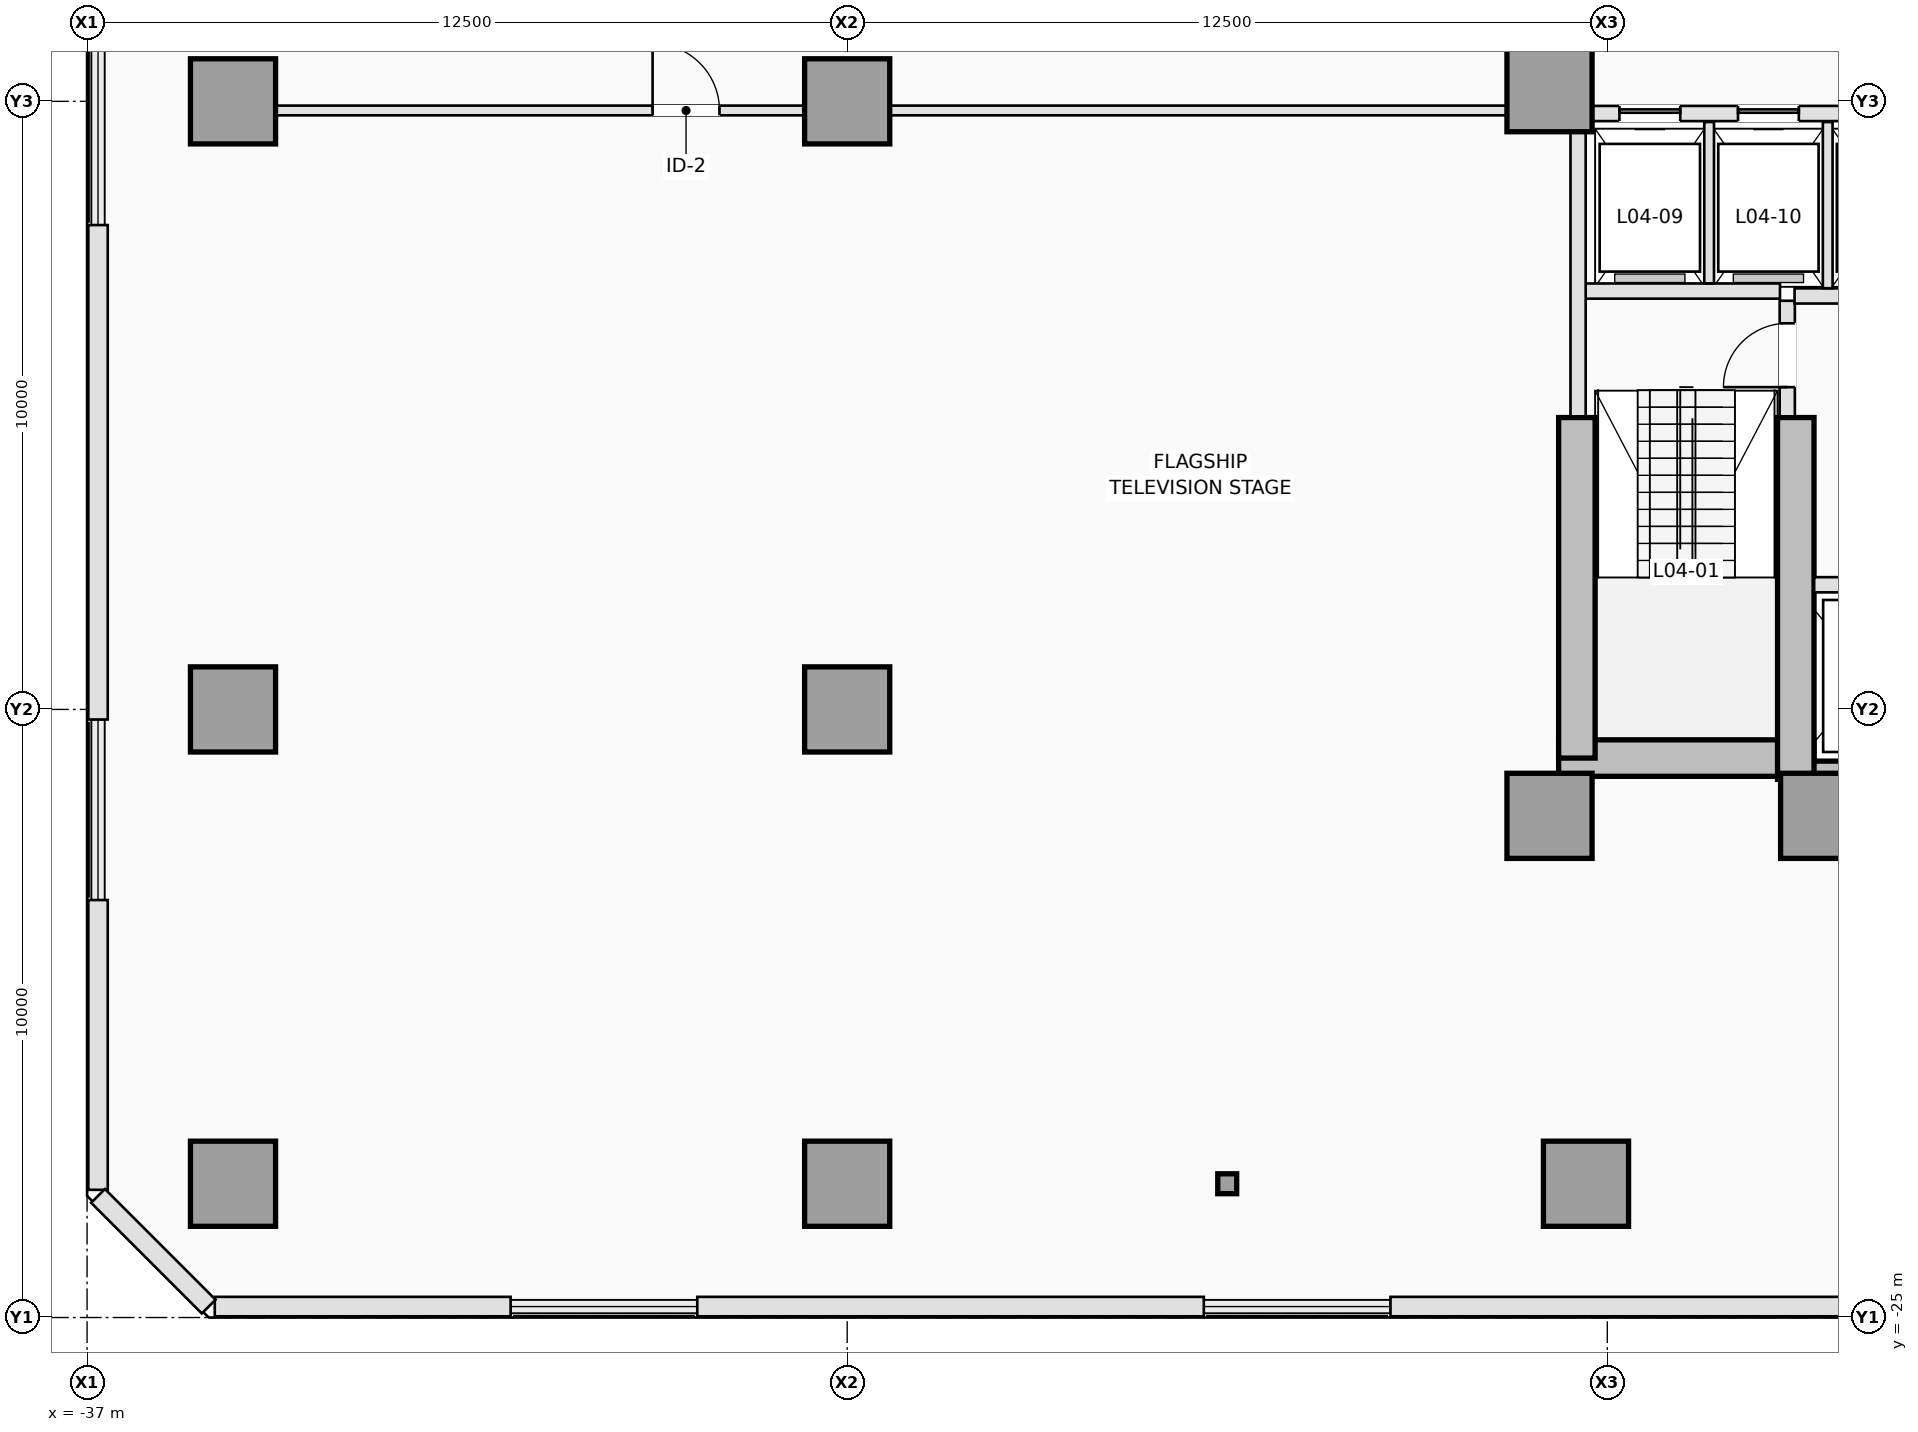
"""IFC4 building model, lengths in metres.
Left out: names, types, materials, properties, quantities, classifications, styles, units other than length and angle.
Written with IfcOpenShell. Run it as: python <this file> out.ifc"""

import sys

from ifc_helpers import new_model, si_unit, direction, frame, frame_2d, origin, origin_2d, place, context, subcontext, project, spatial, rectangle, i_section, extrude, element, fill, save


model = new_model("IFC4")
c1 = context("Model", 3, precision=1e-05, world=origin(), true_north=direction((0.0, 1.0)))
c2 = subcontext(c1, "Body", "Model", "MODEL_VIEW")
j1 = project(units=[si_unit("LENGTHUNIT", "METRE"), si_unit("PLANEANGLEUNIT", "RADIAN")], contexts=[c1])
p1 = place(None, origin())
s1 = spatial("IfcSite", under=j1, at=p1, CompositionType="ELEMENT")
p2 = place(p1, origin())
s2 = spatial("IfcBuilding", under=s1, at=p2, CompositionType="ELEMENT")
p3 = place(p2, frame((0.0, 0.0, 18.5)))
s3 = spatial("IfcBuildingStorey", under=s2, at=p3, CompositionType="ELEMENT", Elevation=18.5)
p4 = place(p3, frame((-12.8, -15.8, 0.0), z_axis=(0.0, 0.0, 1.0), x_axis=(1.0, 0.0, 0.0)))
e1 = element("IfcWall", 1, at=p4, inside=s3, PredefinedType="SHEAR", context=c2, shape_type="SweptSolid", body=[
    extrude(rectangle(XDim=4.2, YDim=0.6, at=frame_2d((2.1, 0.0))), origin(), (0.0, 0.0, 1.0), 4.5),
])
p5 = place(p3, frame((-8.9, -16.15, 0.0), z_axis=(0.0, 0.0, 1.0), x_axis=(1.0, 0.0, 0.0)))
e2 = element("IfcWall", 2, at=p5, inside=s3, PredefinedType="SHEAR", context=c2, shape_type="SweptSolid", body=[
    extrude(rectangle(XDim=5.15, YDim=0.6, at=frame_2d((2.575, 0.0))), origin(), (0.0, 0.0, 1.0), 4.5),
])
p6 = place(p3, frame((-12.5, -15.8, 0.0), z_axis=(0.0, 0.0, 1.0), x_axis=(0.0, 1.0, 0.0)))
e3 = element("IfcWall", 3, at=p6, inside=s3, PredefinedType="SHEAR", context=c2, shape_type="SweptSolid", body=[
    extrude(rectangle(XDim=5.6, YDim=0.6, at=frame_2d((2.8, 0.0))), origin(), (0.0, 0.0, 1.0), 4.5),
])
p7 = place(p3, frame((-8.9, -16.15, 0.0), z_axis=(0.0, 0.0, 1.0), x_axis=(0.0, 1.0, 0.0)))
e4 = element("IfcWall", 4, at=p7, inside=s3, PredefinedType="SHEAR", context=c2, shape_type="SweptSolid", body=[
    extrude(rectangle(XDim=5.95, YDim=0.6, at=frame_2d((2.975, 0.0))), origin(), (0.0, 0.0, 1.0), 4.5),
])
for number, where, z_axis, x_axis in (
    (5, (-12.95, -16.75, 0.0), (0.0, 0.0, 1.0), (1.0, 0.0, 0.0)),
    (6, (-8.45, -16.75, 0.0), (0.0, 0.0, 1.0), (1.0, 0.0, 0.0)),
    (7, (-12.95, -4.8, 0.0), (0.0, 0.0, 1.0), (1.0, 0.0, 0.0)),
    (8, (-34.6, -22.8, 0.0), (0.0, 0.0, 1.0), (1.0, 0.0, 0.0)),
    (9, (-24.5, -22.8, 0.0), (0.0, 0.0, 1.0), (1.0, 0.0, 0.0)),
    (10, (-12.35, -22.8, 0.0), (0.0, 0.0, 1.0), (1.0, 0.0, 0.0)),
    (11, (-34.6, -15.0, 0.0), (0.0, 0.0, 1.0), (1.0, 0.0, 0.0)),
    (12, (-24.5, -15.0, 0.0), (0.0, 0.0, 1.0), (1.0, 0.0, 0.0)),
    (13, (-34.6, -5.0, 0.0), (0.0, 0.0, 1.0), (1.0, 0.0, 0.0)),
    (14, (-24.5, -5.0, 0.0), (0.0, 0.0, 1.0), (1.0, 0.0, 0.0)),
):
    element("IfcColumn", number, at=place(p3, frame(where, z_axis=z_axis, x_axis=x_axis)), inside=s3, PredefinedType="COLUMN", context=c2, shape_type="SweptSolid", body=[
        extrude(rectangle(XDim=1.4, YDim=1.4, at=origin_2d()), origin(), (0.0, 0.0, 1.0), 4.5),
    ])
p8 = place(p3, frame((-18.25, -22.8, 0.0), z_axis=(0.0, 0.0, 1.0), x_axis=(1.0, 0.0, 0.0)))
e15 = element("IfcColumn", 15, at=p8, inside=s3, PredefinedType="COLUMN", context=c2, shape_type="SweptSolid", body=[
    extrude(i_section(OverallWidth=0.311, OverallDepth=0.327, WebThickness=0.016, FlangeThickness=0.025, FilletRadius=0.017, at=origin_2d()), origin(), (0.0, 0.0, 1.0), 4.5),
])
p9 = place(p3, frame((-7.235, -24.82, 0.0), z_axis=(0.0, 0.0, 1.0), x_axis=(-1.0, 0.0, 0.0)))
e16 = element("IfcWall", 16, at=p9, inside=s3, PredefinedType="STANDARD", context=c2, shape_type="SweptSolid", body=[
    extrude(rectangle(XDim=8.33, YDim=0.32, at=frame_2d((4.165, 0.0))), origin(), (0.0, 0.0, 1.0), 4.08),
])
p10 = place(p3, frame((-18.635, -24.82, 0.0), z_axis=(0.0, 0.0, 1.0), x_axis=(-1.0, 0.0, 0.0)))
e17 = element("IfcWall", 17, at=p10, inside=s3, PredefinedType="STANDARD", context=c2, shape_type="SweptSolid", body=[
    extrude(rectangle(XDim=8.33, YDim=0.32, at=frame_2d((4.165, 0.0))), origin(), (0.0, 0.0, 1.0), 4.08),
])
p11 = place(p3, frame((-30.035, -24.82, 0.0), z_axis=(0.0, 0.0, 1.0), x_axis=(-1.0, 0.0, 0.0)))
e18 = element("IfcWall", 18, at=p11, inside=s3, PredefinedType="STANDARD", context=c2, shape_type="SweptSolid", body=[
    extrude(rectangle(XDim=4.865, YDim=0.32, at=frame_2d((2.433, 0.0))), origin(), (0.0, 0.0, 1.0), 4.08),
])
p12 = place(p3, frame((-36.82, -22.9, 0.0), z_axis=(0.0, 0.0, 1.0), x_axis=(0.0, 1.0, 0.0)))
e19 = element("IfcWall", 19, at=p12, inside=s3, PredefinedType="STANDARD", context=c2, shape_type="SweptSolid", body=[
    extrude(rectangle(XDim=4.765, YDim=0.32, at=frame_2d((2.383, 0.0))), origin(), (0.0, 0.0, 1.0), 4.08),
])
p13 = place(p3, frame((-36.82, -15.165, 0.0), z_axis=(0.0, 0.0, 1.0), x_axis=(0.0, 1.0, 0.0)))
e20 = element("IfcWall", 20, at=p13, inside=s3, PredefinedType="STANDARD", context=c2, shape_type="SweptSolid", body=[
    extrude(rectangle(XDim=8.131, YDim=0.32, at=frame_2d((4.065, 0.0))), origin(), (0.0, 0.0, 1.0), 4.08),
])
p14 = place(p3, frame((-35.0, -24.82, 0.0), z_axis=(0.0, 0.0, 1.0), x_axis=(-0.707106781187, 0.707106781187, 0.0)))
e21 = element("IfcWall", 21, at=p14, inside=s3, PredefinedType="STANDARD", context=c2, shape_type="SweptSolid", body=[
    extrude(rectangle(XDim=2.574, YDim=0.32, at=frame_2d((1.287, 0.0))), origin(), (0.0, 0.0, 1.0), 4.08),
])
p15 = place(p3, frame((-9.04, -10.18, 0.0), z_axis=(0.0, 0.0, 1.0), x_axis=(0.0, 1.0, 0.0)))
e22 = element("IfcWall", 22, at=p15, inside=s3, PredefinedType="PARTITIONING", context=c2, shape_type="SweptSolid", body=[
    extrude(rectangle(XDim=1.9, YDim=0.25, at=frame_2d((0.95, 0.0))), origin(), (0.0, 0.0, 1.0), 4.08),
])
p16 = place(p15, frame((0.48, 0.0, 0.0)))
e23 = element("IfcOpeningElement", 23, at=p16, cuts=e22, PredefinedType="OPENING", context=c2, shape_type="SweptSolid", body=[
    extrude(rectangle(XDim=1.05, YDim=2.15, at=frame_2d((0.525, 1.075))), frame((0.0, 0.135, 0.0), z_axis=(0.0, -1.0, 0.0), x_axis=(1.0, 0.0, 0.0)), (0.0, 0.0, 1.0), 0.27),
])
p17 = place(p3, frame((-12.38, -8.12, 0.0), z_axis=(0.0, 0.0, 1.0), x_axis=(1.0, 0.0, 0.0)))
e24 = element("IfcWall", 24, at=p17, inside=s3, PredefinedType="PARTITIONING", context=c2, shape_type="SweptSolid", body=[
    extrude(rectangle(XDim=3.22, YDim=0.25, at=frame_2d((1.61, 0.0))), origin(), (0.0, 0.0, 1.0), 4.08),
])
p18 = place(p3, frame((-12.48, -10.18, 0.0), z_axis=(0.0, 0.0, 1.0), x_axis=(0.0, 1.0, 0.0)))
e25 = element("IfcWall", 25, at=p18, inside=s3, PredefinedType="PARTITIONING", context=c2, shape_type="SweptSolid", body=[
    extrude(rectangle(XDim=4.678, YDim=0.25, at=frame_2d((2.339, 0.0))), origin(), (0.0, 0.0, 1.0), 4.08),
])
p19 = place(p3, frame((-8.598, -12.95, 0.0), z_axis=(0.0, 0.0, 1.0), x_axis=(1.0, 0.0, 0.0)))
e26 = element("IfcWall", 26, at=p19, inside=s3, PredefinedType="PARTITIONING", context=c2, shape_type="SweptSolid", body=[
    extrude(rectangle(XDim=4.918, YDim=0.25, at=frame_2d((2.459, 0.0))), origin(), (0.0, 0.0, 1.0), 4.08),
])
p20 = place(p19, frame((0.498, 0.0, 0.0)))
e27 = element("IfcOpeningElement", 27, at=p20, cuts=e26, PredefinedType="OPENING", context=c2, shape_type="SweptSolid", body=[
    extrude(rectangle(XDim=1.1, YDim=2.15, at=frame_2d((0.55, 1.075))), frame((0.0, 0.135, 0.0), z_axis=(0.0, -1.0, 0.0), x_axis=(1.0, 0.0, 0.0)), (0.0, 0.0, 1.0), 0.27),
])
p21 = place(p19, frame((2.398, 0.0, 0.0)))
e28 = element("IfcOpeningElement", 28, at=p21, cuts=e26, PredefinedType="OPENING", context=c2, shape_type="SweptSolid", body=[
    extrude(rectangle(XDim=0.88, YDim=2.1, at=frame_2d((0.44, 1.05))), frame((0.0, 0.135, 0.0), z_axis=(0.0, -1.0, 0.0), x_axis=(1.0, 0.0, 0.0)), (0.0, 0.0, 1.0), 0.27),
])
p22 = place(p19, frame((3.798, 0.0, 0.0)))
e29 = element("IfcOpeningElement", 29, at=p22, cuts=e26, PredefinedType="OPENING", context=c2, shape_type="SweptSolid", body=[
    extrude(rectangle(XDim=0.88, YDim=2.1, at=frame_2d((0.44, 1.05))), frame((0.0, 0.135, 0.0), z_axis=(0.0, -1.0, 0.0), x_axis=(1.0, 0.0, 0.0)), (0.0, 0.0, 1.0), 0.27),
])
p23 = place(p3, frame((-8.92, -8.2, 0.0), z_axis=(0.0, 0.0, 1.0), x_axis=(1.0, 0.0, 0.0)))
e30 = element("IfcWall", 30, at=p23, inside=s3, PredefinedType="PARTITIONING", context=c2, shape_type="SweptSolid", body=[
    extrude(rectangle(XDim=5.24, YDim=0.25, at=frame_2d((2.62, 0.0))), origin(), (0.0, 0.0, 1.0), 4.08),
])
p24 = place(p3, frame((-12.248, -5.2, 0.0), z_axis=(0.0, 0.0, 1.0), x_axis=(1.0, 0.0, 0.0)))
e31 = element("IfcWall", 31, at=p24, inside=s3, PredefinedType="PARTITIONING", context=c2, shape_type="SweptSolid", body=[
    extrude(rectangle(XDim=7.796, YDim=0.25, at=frame_2d((3.898, 0.0))), origin(), (0.0, 0.0, 1.0), 4.08),
])
p25 = place(p24, frame((0.448, 0.0, 0.0)))
e32 = element("IfcOpeningElement", 32, at=p25, cuts=e31, PredefinedType="OPENING", context=c2, shape_type="SweptSolid", body=[
    extrude(rectangle(XDim=1.0, YDim=2.15, at=frame_2d((0.5, 1.075))), frame((0.0, 0.135, 0.0), z_axis=(0.0, -1.0, 0.0), x_axis=(1.0, 0.0, 0.0)), (0.0, 0.0, 1.0), 0.27),
])
p26 = place(p24, frame((2.398, 0.0, 0.0)))
e33 = element("IfcOpeningElement", 33, at=p26, cuts=e31, PredefinedType="OPENING", context=c2, shape_type="SweptSolid", body=[
    extrude(rectangle(XDim=1.0, YDim=2.15, at=frame_2d((0.5, 1.075))), frame((0.0, 0.135, 0.0), z_axis=(0.0, -1.0, 0.0), x_axis=(1.0, 0.0, 0.0)), (0.0, 0.0, 1.0), 0.27),
])
p27 = place(p24, frame((4.348, 0.0, 0.0)))
e34 = element("IfcOpeningElement", 34, at=p27, cuts=e31, PredefinedType="OPENING", context=c2, shape_type="SweptSolid", body=[
    extrude(rectangle(XDim=1.0, YDim=2.15, at=frame_2d((0.5, 1.075))), frame((0.0, 0.135, 0.0), z_axis=(0.0, -1.0, 0.0), x_axis=(1.0, 0.0, 0.0)), (0.0, 0.0, 1.0), 0.27),
])
p28 = place(p24, frame((6.298, 0.0, 0.0)))
e35 = element("IfcOpeningElement", 35, at=p28, cuts=e31, PredefinedType="OPENING", context=c2, shape_type="SweptSolid", body=[
    extrude(rectangle(XDim=1.0, YDim=2.15, at=frame_2d((0.5, 1.075))), frame((0.0, 0.135, 0.0), z_axis=(0.0, -1.0, 0.0), x_axis=(1.0, 0.0, 0.0)), (0.0, 0.0, 1.0), 0.27),
])
p29 = place(p3, frame((-10.325, -7.993, 0.0), z_axis=(0.0, 0.0, 1.0), x_axis=(0.0, 1.0, 0.0)))
e36 = element("IfcWall", 36, at=p29, inside=s3, PredefinedType="PARTITIONING", context=c2, shape_type="SweptSolid", body=[
    extrude(rectangle(XDim=2.653, YDim=0.16, at=frame_2d((1.326, 0.0))), origin(), (0.0, 0.0, 1.0), 4.08),
])
p30 = place(p3, frame((-8.375, -8.073, 0.0), z_axis=(0.0, 0.0, 1.0), x_axis=(0.0, 1.0, 0.0)))
e37 = element("IfcWall", 37, at=p30, inside=s3, PredefinedType="PARTITIONING", context=c2, shape_type="SweptSolid", body=[
    extrude(rectangle(XDim=2.733, YDim=0.16, at=frame_2d((1.366, 0.0))), origin(), (0.0, 0.0, 1.0), 4.08),
])
p31 = place(p3, frame((-33.898, -5.15, 0.0), z_axis=(0.0, 0.0, 1.0), x_axis=(1.0, 0.0, 0.0)))
e38 = element("IfcWall", 38, at=p31, inside=s3, PredefinedType="PARTITIONING", context=c2, shape_type="SweptSolid", body=[
    extrude(rectangle(XDim=8.696, YDim=0.16, at=frame_2d((4.348, 0.0))), origin(), (0.0, 0.0, 1.0), 3.056),
])
p32 = place(p31, frame((6.198, 0.0, 0.0)))
e39 = element("IfcOpeningElement", 39, at=p32, cuts=e38, PredefinedType="OPENING", context=c2, shape_type="SweptSolid", body=[
    extrude(rectangle(XDim=1.1, YDim=2.15, at=frame_2d((0.55, 1.075))), frame((0.0, 0.09, 0.0), z_axis=(0.0, -1.0, 0.0), x_axis=(1.0, 0.0, 0.0)), (0.0, 0.0, 1.0), 0.18),
])
p33 = place(p3, frame((-23.798, -5.15, 0.0), z_axis=(0.0, 0.0, 1.0), x_axis=(1.0, 0.0, 0.0)))
e40 = element("IfcWall", 40, at=p33, inside=s3, PredefinedType="PARTITIONING", context=c2, shape_type="SweptSolid", body=[
    extrude(rectangle(XDim=10.146, YDim=0.16, at=frame_2d((5.073, 0.0))), origin(), (0.0, 0.0, 1.0), 3.056),
])
p34 = place(p25, origin())
e41 = element("IfcDoor", 41, at=p34, inside=s3, OperationType="SLIDING_TO_LEFT", PredefinedType="DOOR", context=c2, shape_type="SweptSolid", body=[
    extrude(rectangle(XDim=1.0, YDim=2.15, at=frame_2d((0.5, 1.075))), frame((0.0, 0.025, 0.0), z_axis=(0.0, -1.0, 0.0), x_axis=(1.0, 0.0, 0.0)), (0.0, 0.0, 1.0), 0.05),
])
fill(e32, e41)
p35 = place(p26, origin())
e42 = element("IfcDoor", 42, at=p35, inside=s3, OperationType="SLIDING_TO_LEFT", PredefinedType="DOOR", context=c2, shape_type="SweptSolid", body=[
    extrude(rectangle(XDim=1.0, YDim=2.15, at=frame_2d((0.5, 1.075))), frame((0.0, 0.025, 0.0), z_axis=(0.0, -1.0, 0.0), x_axis=(1.0, 0.0, 0.0)), (0.0, 0.0, 1.0), 0.05),
])
fill(e33, e42)
p36 = place(p16, origin())
e43 = element("IfcDoor", 43, at=p36, inside=s3, OperationType="SINGLE_SWING_LEFT", PredefinedType="DOOR", context=c2, shape_type="SweptSolid", body=[
    extrude(rectangle(XDim=1.05, YDim=2.15, at=frame_2d((0.525, 1.075))), frame((0.0, 0.025, 0.0), z_axis=(0.0, -1.0, 0.0), x_axis=(1.0, 0.0, 0.0)), (0.0, 0.0, 1.0), 0.05),
])
fill(e23, e43)
p37 = place(p32, origin())
e44 = element("IfcDoor", 44, at=p37, inside=s3, OperationType="SINGLE_SWING_LEFT", PredefinedType="DOOR", context=c2, shape_type="SweptSolid", body=[
    extrude(rectangle(XDim=1.1, YDim=2.15, at=frame_2d((0.55, 1.075))), frame((0.0, 0.025, 0.0), z_axis=(0.0, -1.0, 0.0), x_axis=(1.0, 0.0, 0.0)), (0.0, 0.0, 1.0), 0.05),
])
fill(e39, e44)
save(model, sys.argv[1])
